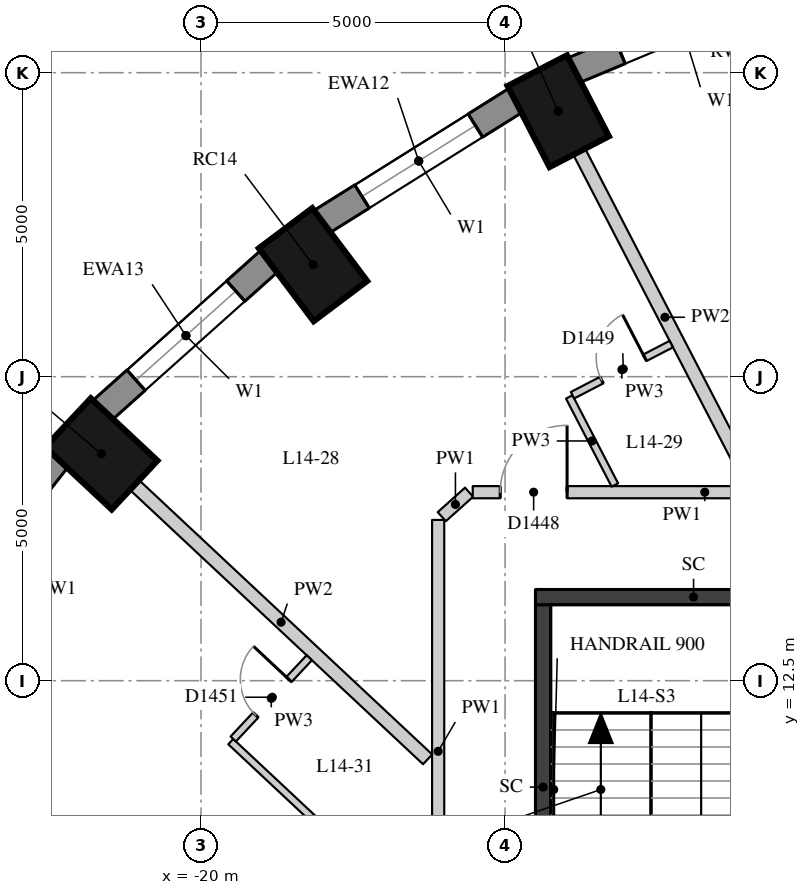
"""IFC4 building model, lengths in metres.
Left out: names, types, materials, properties, quantities, classifications, styles, units other than length and angle.
Written with IfcOpenShell. Run it as: python <this file> out.ifc"""

import sys

from ifc_helpers import new_model, si_unit, direction, frame, frame_2d, origin, origin_2d, place, context, subcontext, project, spatial, rectangle, extrude, element, fill, save


model = new_model("IFC4")
c1 = context("Model", 3, precision=1e-05, world=origin(), true_north=direction((0.0, 1.0)))
c2 = subcontext(c1, "Body", "Model", "MODEL_VIEW")
j1 = project(units=[si_unit("LENGTHUNIT", "METRE"), si_unit("PLANEANGLEUNIT", "RADIAN")], contexts=[c1])
p1 = place(None, origin())
s1 = spatial("IfcSite", under=j1, at=p1, CompositionType="ELEMENT")
p2 = place(p1, origin())
s2 = spatial("IfcBuilding", under=s1, at=p2, CompositionType="ELEMENT")
p3 = place(p2, frame((0.0, 0.0, 54.7)))
s3 = spatial("IfcBuildingStorey", under=s2, at=p3, CompositionType="ELEMENT", Elevation=54.7)
for number, where, z_axis, x_axis in (
    (1, (-14.125, 21.867, 0.0), (0.0, 0.0, 1.0), (-0.46, 0.888, 0.0)),
    (2, (-18.159, 19.343, 0.0), (0.0, 0.0, 1.0), (-0.601, 0.799, 0.0)),
    (3, (-21.641, 16.23, 0.0), (0.0, 0.0, 1.0), (-0.73, 0.683, 0.0)),
):
    element("IfcColumn", number, at=place(p3, frame(where, z_axis=z_axis, x_axis=x_axis)), inside=s3, PredefinedType="COLUMN", context=c2, shape_type="SweptSolid", body=[
        extrude(rectangle(XDim=1.5, YDim=1.1, at=origin_2d()), origin(), (0.0, 0.0, 1.0), 3.3),
    ])
p4 = place(p3, frame((-10.315, 24.021, 0.0), z_axis=(0.0, 0.0, 1.0), x_axis=(-0.923031964282, -0.384723267966, 0.0)))
e4 = element("IfcWall", 4, at=p4, inside=s3, PredefinedType="SOLIDWALL", context=c2, shape_type="SweptSolid", body=[
    extrude(rectangle(XDim=3.856, YDim=0.45, at=frame_2d((1.928, 0.0))), origin(), (0.0, 0.0, 1.0), 3.02),
])
p5 = place(p4, frame((0.828, 0.0, 0.4)))
e5 = element("IfcOpeningElement", 5, at=p5, cuts=e4, PredefinedType="OPENING", context=c2, shape_type="SweptSolid", body=[
    extrude(rectangle(XDim=2.2, YDim=1.75, at=frame_2d((1.1, 0.875))), frame((0.0, 0.235, 0.0), z_axis=(0.0, -1.0, 0.0), x_axis=(1.0, 0.0, 0.0)), (0.0, 0.0, 1.0), 0.47),
])
p6 = place(p3, frame((-14.817, 22.051, 0.0), z_axis=(0.0, 0.0, 1.0), x_axis=(-0.847635480093, -0.530579016629, 0.0)))
e6 = element("IfcWall", 6, at=p6, inside=s3, PredefinedType="SOLIDWALL", context=c2, shape_type="SweptSolid", body=[
    extrude(rectangle(XDim=3.782, YDim=0.45, at=frame_2d((1.891, 0.0))), origin(), (0.0, 0.0, 1.0), 3.02),
])
p7 = place(p6, frame((0.791, 0.0, 0.4)))
e7 = element("IfcOpeningElement", 7, at=p7, cuts=e6, PredefinedType="OPENING", context=c2, shape_type="SweptSolid", body=[
    extrude(rectangle(XDim=2.2, YDim=1.75, at=frame_2d((1.1, 0.875))), frame((0.0, 0.235, 0.0), z_axis=(0.0, -1.0, 0.0), x_axis=(1.0, 0.0, 0.0)), (0.0, 0.0, 1.0), 0.47),
])
p8 = place(p3, frame((-18.871, 19.407, 0.0), z_axis=(0.0, 0.0, 1.0), x_axis=(-0.745526233716, -0.66647628228, 0.0)))
e8 = element("IfcWall", 8, at=p8, inside=s3, PredefinedType="SOLIDWALL", context=c2, shape_type="SweptSolid", body=[
    extrude(rectangle(XDim=3.697, YDim=0.45, at=frame_2d((1.848, 0.0))), origin(), (0.0, 0.0, 1.0), 3.02),
])
p9 = place(p8, frame((0.749, 0.0, 0.4)))
e9 = element("IfcOpeningElement", 9, at=p9, cuts=e8, PredefinedType="OPENING", context=c2, shape_type="SweptSolid", body=[
    extrude(rectangle(XDim=2.2, YDim=1.75, at=frame_2d((1.1, 0.875))), frame((0.0, 0.235, 0.0), z_axis=(0.0, -1.0, 0.0), x_axis=(1.0, 0.0, 0.0)), (0.0, 0.0, 1.0), 0.47),
])
p10 = place(p3, frame((-22.352, 16.17, 0.0), z_axis=(0.0, 0.0, 1.0), x_axis=(-0.616661975264, -0.787228053529, 0.0)))
e10 = element("IfcWall", 10, at=p10, inside=s3, PredefinedType="SOLIDWALL", context=c2, shape_type="SweptSolid", body=[
    extrude(rectangle(XDim=3.61, YDim=0.45, at=frame_2d((1.805, 0.0))), origin(), (0.0, 0.0, 1.0), 3.02),
])
p11 = place(p10, frame((0.705, 0.0, 0.4)))
e11 = element("IfcOpeningElement", 11, at=p11, cuts=e10, PredefinedType="OPENING", context=c2, shape_type="SweptSolid", body=[
    extrude(rectangle(XDim=2.2, YDim=1.75, at=frame_2d((1.1, 0.875))), frame((0.0, 0.235, 0.0), z_axis=(0.0, -1.0, 0.0), x_axis=(1.0, 0.0, 0.0)), (0.0, 0.0, 1.0), 0.47),
])
p12 = place(p3, frame((-14.375, 7.75, -0.28), z_axis=(0.0, 0.0, 1.0), x_axis=(0.0, 1.0, 0.0)))
e12 = element("IfcWall", 12, at=p12, inside=s3, PredefinedType="SHEAR", context=c2, shape_type="SweptSolid", body=[
    extrude(rectangle(XDim=6.0, YDim=0.25, at=frame_2d((3.0, 0.0))), origin(), (0.0, 0.0, 1.0), 3.3),
])
p13 = place(p3, frame((-14.5, 13.875, -0.28), z_axis=(0.0, 0.0, 1.0), x_axis=(1.0, 0.0, 0.0)))
e13 = element("IfcWall", 13, at=p13, inside=s3, PredefinedType="SHEAR", context=c2, shape_type="SweptSolid", body=[
    extrude(rectangle(XDim=5.2, YDim=0.25, at=frame_2d((2.6, 0.0))), origin(), (0.0, 0.0, 1.0), 3.3),
])
p14 = place(p3, frame((-16.1, 7.533, 0.0), z_axis=(0.0, 0.0, 1.0), x_axis=(0.0, 1.0, 0.0)))
e14 = element("IfcWall", 14, at=p14, inside=s3, PredefinedType="PARTITIONING", context=c2, shape_type="SweptSolid", body=[
    extrude(rectangle(XDim=7.611, YDim=0.2, at=frame_2d((3.806, 0.0))), origin(), (0.0, 0.0, 1.0), 3.02),
])
p15 = place(p3, frame((-16.041, 15.198, 0.0), z_axis=(0.0, 0.0, 1.0), x_axis=(0.744722115519, 0.667374685359, 0.0)))
e15 = element("IfcWall", 15, at=p15, inside=s3, PredefinedType="PARTITIONING", context=c2, shape_type="SweptSolid", body=[
    extrude(rectangle(XDim=0.603, YDim=0.2, at=frame_2d((0.301, 0.0))), origin(), (0.0, 0.0, 1.0), 3.02),
])
p16 = place(p3, frame((-15.531, 15.6, 0.0), z_axis=(0.0, 0.0, 1.0), x_axis=(1.0, 0.0, 0.0)))
e16 = element("IfcWall", 16, at=p16, inside=s3, PredefinedType="PARTITIONING", context=c2, shape_type="SweptSolid", body=[
    extrude(rectangle(XDim=7.632, YDim=0.2, at=frame_2d((3.816, 0.0))), origin(), (0.0, 0.0, 1.0), 3.02),
])
p17 = place(p16, frame((5.283, 0.0, 0.0)))
e17 = element("IfcOpeningElement", 17, at=p17, cuts=e16, PredefinedType="OPENING", context=c2, shape_type="SweptSolid", body=[
    extrude(rectangle(XDim=1.0, YDim=2.1, at=frame_2d((0.5, 1.05))), frame((0.0, 0.11, 0.0), z_axis=(0.0, -1.0, 0.0), x_axis=(1.0, 0.0, 0.0)), (0.0, 0.0, 1.0), 0.22),
])
p18 = place(p16, frame((0.451, 0.0, 0.0)))
e18 = element("IfcOpeningElement", 18, at=p18, cuts=e16, PredefinedType="OPENING", context=c2, shape_type="SweptSolid", body=[
    extrude(rectangle(XDim=1.1, YDim=2.1, at=frame_2d((0.55, 1.05))), frame((0.0, 0.11, 0.0), z_axis=(0.0, -1.0, 0.0), x_axis=(1.0, 0.0, 0.0)), (0.0, 0.0, 1.0), 0.22),
])
p19 = place(p3, frame((-13.78, 21.201, 0.0), z_axis=(0.0, 0.0, 1.0), x_axis=(0.459699000582, -0.888074787878, 0.0)))
e19 = element("IfcWall", 19, at=p19, inside=s3, PredefinedType="PARTITIONING", context=c2, shape_type="SweptSolid", body=[
    extrude(rectangle(XDim=6.134, YDim=0.22, at=frame_2d((3.067, 0.0))), origin(), (0.0, 0.0, 1.0), 3.02),
])
p20 = place(p3, frame((-21.093, 15.718, 0.0), z_axis=(0.0, 0.0, 1.0), x_axis=(0.73009284205, -0.683347965525, 0.0)))
e20 = element("IfcWall", 20, at=p20, inside=s3, PredefinedType="PARTITIONING", context=c2, shape_type="SweptSolid", body=[
    extrude(rectangle(XDim=6.602, YDim=0.22, at=frame_2d((3.301, 0.0))), origin(), (0.0, 0.0, 1.0), 3.02),
])
p21 = place(p3, frame((-13.194, 15.718, 0.0), z_axis=(0.0, 0.0, 1.0), x_axis=(-0.459736274936, 0.888055492359, 0.0)))
e21 = element("IfcWall", 21, at=p21, inside=s3, PredefinedType="PARTITIONING", context=c2, shape_type="SweptSolid", body=[
    extrude(rectangle(XDim=1.632, YDim=0.12, at=frame_2d((0.816, 0.0))), origin(), (0.0, 0.0, 1.0), 3.02),
])
p22 = place(p3, frame((-16.229, 8.426, 0.0), z_axis=(0.0, 0.0, 1.0), x_axis=(-0.730077325201, 0.683364543438, 0.0)))
e22 = element("IfcWall", 22, at=p22, inside=s3, PredefinedType="PARTITIONING", context=c2, shape_type="SweptSolid", body=[
    extrude(rectangle(XDim=4.495, YDim=0.12, at=frame_2d((2.247, 0.0))), origin(), (0.0, 0.0, 1.0), 3.02),
])
p23 = place(p3, frame((-13.891, 17.195, 0.0), z_axis=(0.0, 0.0, 1.0), x_axis=(0.88806930088, 0.459709600546, 0.0)))
e23 = element("IfcWall", 23, at=p23, inside=s3, PredefinedType="PARTITIONING", context=c2, shape_type="SweptSolid", body=[
    extrude(rectangle(XDim=1.83, YDim=0.12, at=frame_2d((0.915, 0.0))), origin(), (0.0, 0.0, 1.0), 3.02),
])
p24 = place(p23, frame((0.54, 0.0, 0.0)))
e24 = element("IfcOpeningElement", 24, at=p24, cuts=e23, PredefinedType="OPENING", context=c2, shape_type="SweptSolid", body=[
    extrude(rectangle(XDim=0.8, YDim=2.1, at=frame_2d((0.4, 1.05))), frame((0.0, 0.07, 0.0), z_axis=(0.0, -1.0, 0.0), x_axis=(1.0, 0.0, 0.0)), (0.0, 0.0, 1.0), 0.14),
])
p25 = place(p3, frame((-19.47, 11.542, 0.0), z_axis=(0.0, 0.0, 1.0), x_axis=(0.683306289544, 0.730131847456, 0.0)))
e25 = element("IfcWall", 25, at=p25, inside=s3, PredefinedType="PARTITIONING", context=c2, shape_type="SweptSolid", body=[
    extrude(rectangle(XDim=1.83, YDim=0.12, at=frame_2d((0.915, 0.0))), origin(), (0.0, 0.0, 1.0), 3.02),
])
p26 = place(p25, frame((0.54, 0.0, 0.0)))
e26 = element("IfcOpeningElement", 26, at=p26, cuts=e25, PredefinedType="OPENING", context=c2, shape_type="SweptSolid", body=[
    extrude(rectangle(XDim=0.8, YDim=2.1, at=frame_2d((0.4, 1.05))), frame((0.0, 0.07, 0.0), z_axis=(0.0, -1.0, 0.0), x_axis=(1.0, 0.0, 0.0)), (0.0, 0.0, 1.0), 0.14),
])
p27 = place(p5, origin())
e27 = element("IfcWindow", 27, at=p27, inside=s3, PartitioningType="SINGLE_PANEL", PredefinedType="WINDOW", context=c2, shape_type="SweptSolid", body=[
    extrude(rectangle(XDim=2.2, YDim=1.75, at=frame_2d((1.1, 0.875))), frame((0.0, 0.035, 0.0), z_axis=(0.0, -1.0, 0.0), x_axis=(1.0, 0.0, 0.0)), (0.0, 0.0, 1.0), 0.06),
])
fill(e5, e27)
p28 = place(p7, origin())
e28 = element("IfcWindow", 28, at=p28, inside=s3, PartitioningType="SINGLE_PANEL", PredefinedType="WINDOW", context=c2, shape_type="SweptSolid", body=[
    extrude(rectangle(XDim=2.2, YDim=1.75, at=frame_2d((1.1, 0.875))), frame((0.0, 0.035, 0.0), z_axis=(0.0, -1.0, 0.0), x_axis=(1.0, 0.0, 0.0)), (0.0, 0.0, 1.0), 0.06),
])
fill(e7, e28)
p29 = place(p9, origin())
e29 = element("IfcWindow", 29, at=p29, inside=s3, PartitioningType="SINGLE_PANEL", PredefinedType="WINDOW", context=c2, shape_type="SweptSolid", body=[
    extrude(rectangle(XDim=2.2, YDim=1.75, at=frame_2d((1.1, 0.875))), frame((0.0, 0.035, 0.0), z_axis=(0.0, -1.0, 0.0), x_axis=(1.0, 0.0, 0.0)), (0.0, 0.0, 1.0), 0.06),
])
fill(e9, e29)
p30 = place(p18, origin())
e30 = element("IfcDoor", 30, at=p30, inside=s3, OperationType="SINGLE_SWING_RIGHT", PredefinedType="DOOR", context=c2, shape_type="SweptSolid", body=[
    extrude(rectangle(XDim=1.1, YDim=2.1, at=frame_2d((0.55, 1.05))), frame((0.0, 0.025, 0.0), z_axis=(0.0, -1.0, 0.0), x_axis=(1.0, 0.0, 0.0)), (0.0, 0.0, 1.0), 0.05),
])
fill(e18, e30)
p31 = place(p24, origin())
e31 = element("IfcDoor", 31, at=p31, inside=s3, OperationType="SINGLE_SWING_RIGHT", PredefinedType="DOOR", context=c2, shape_type="SweptSolid", body=[
    extrude(rectangle(XDim=0.8, YDim=2.1, at=frame_2d((0.4, 1.05))), frame((0.0, 0.025, 0.0), z_axis=(0.0, -1.0, 0.0), x_axis=(1.0, 0.0, 0.0)), (0.0, 0.0, 1.0), 0.05),
])
fill(e24, e31)
p32 = place(p26, origin())
e32 = element("IfcDoor", 32, at=p32, inside=s3, OperationType="SINGLE_SWING_RIGHT", PredefinedType="DOOR", context=c2, shape_type="SweptSolid", body=[
    extrude(rectangle(XDim=0.8, YDim=2.1, at=frame_2d((0.4, 1.05))), frame((0.0, 0.025, 0.0), z_axis=(0.0, -1.0, 0.0), x_axis=(1.0, 0.0, 0.0)), (0.0, 0.0, 1.0), 0.05),
])
fill(e26, e32)
save(model, sys.argv[1])
